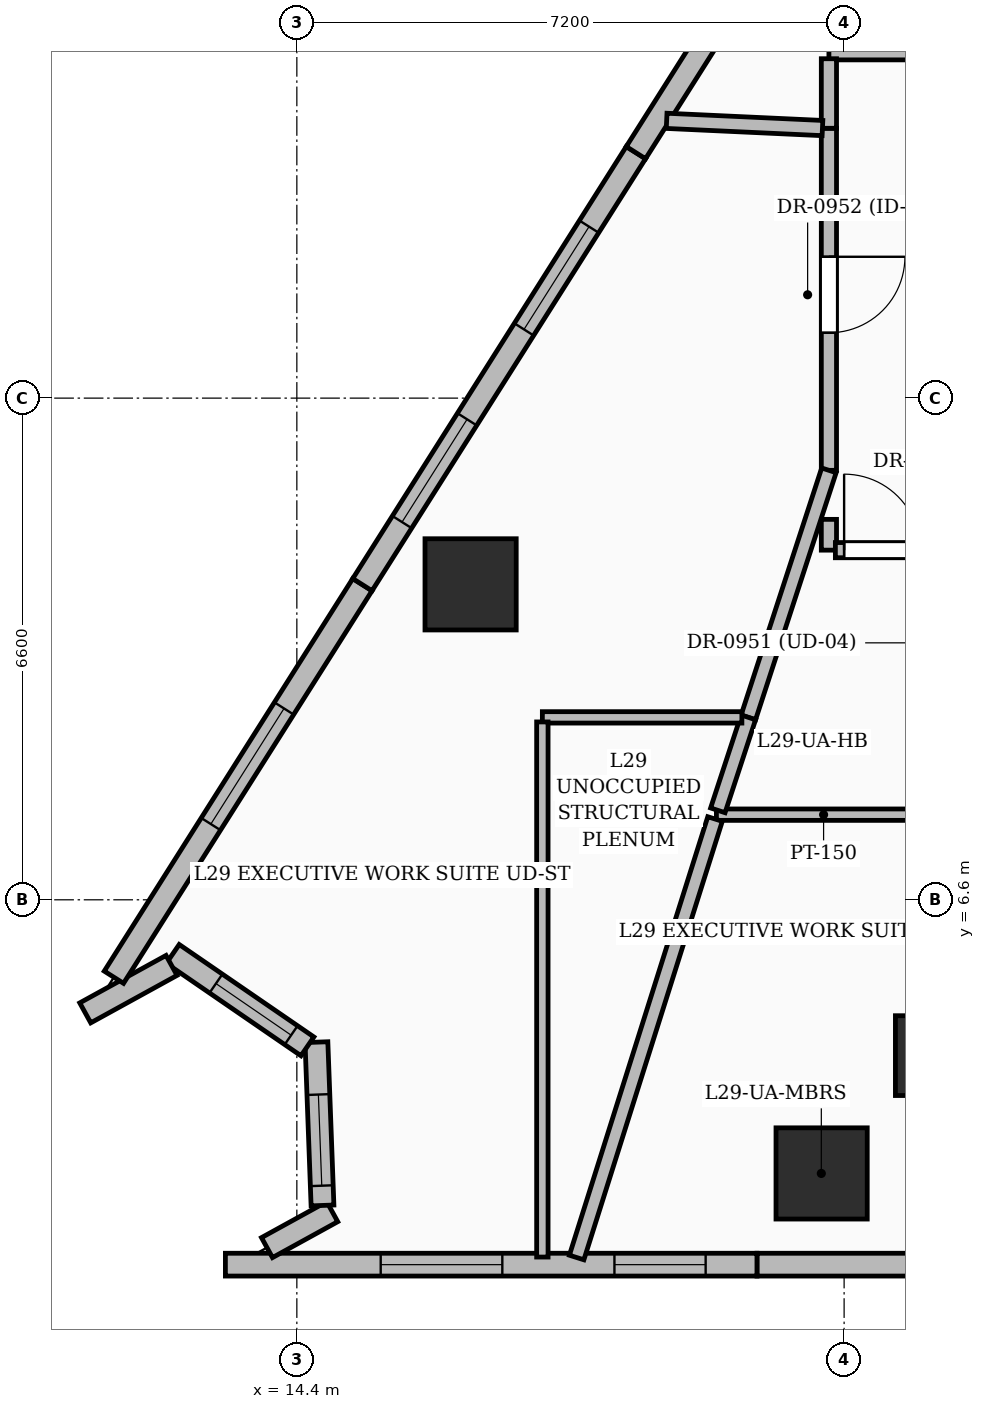
"""IFC4 building model, lengths in metres.
Left out: names, types, materials, properties, quantities, classifications, styles, units other than length and angle.
Written with IfcOpenShell. Run it as: python <this file> out.ifc"""

import sys

from ifc_helpers import new_model, si_unit, direction, frame, frame_2d, origin, origin_2d, place, context, subcontext, project, spatial, rectangle, extrude, element, fill, save


model = new_model("IFC4")
c1 = context("Model", 3, precision=1e-05, world=origin(), true_north=direction((0.0, 1.0)))
c2 = subcontext(c1, "Body", "Model", "MODEL_VIEW")
j1 = project(units=[si_unit("LENGTHUNIT", "METRE"), si_unit("PLANEANGLEUNIT", "RADIAN")], contexts=[c1])
p1 = place(None, origin())
s1 = spatial("IfcSite", under=j1, at=p1, CompositionType="ELEMENT")
p2 = place(p1, origin())
s2 = spatial("IfcBuilding", under=s1, at=p2, CompositionType="ELEMENT")
p3 = place(p2, frame((0.0, 0.0, 117.6)))
s3 = spatial("IfcBuildingStorey", under=s2, at=p3, CompositionType="ELEMENT", Elevation=117.6)
p4 = place(p3, frame((22.8, 4.55, 0.0), z_axis=(0.0, 0.0, 1.0), x_axis=(1.0, 0.0, 0.0)))
e1 = element("IfcColumn", 1, at=p4, inside=s3, PredefinedType="COLUMN", context=c2, shape_type="SweptSolid", body=[
    extrude(rectangle(XDim=1.05, YDim=1.05, at=origin_2d()), origin(), (0.0, 0.0, 1.0), 3.6),
])
for number, where, z_axis, x_axis in (
    (2, (21.304, 3.0, 0.0), (0.0, 0.0, 1.0), (1.0, 0.0, 0.0)),
    (3, (16.686, 10.75, 0.0), (0.0, 0.0, 1.0), (1.0, 0.0, 0.0)),
):
    element("IfcColumn", number, at=place(p3, frame(where, z_axis=z_axis, x_axis=x_axis)), inside=s3, PredefinedType="COLUMN", context=c2, shape_type="SweptSolid", body=[
        extrude(rectangle(XDim=1.2, YDim=1.2, at=origin_2d()), origin(), (0.0, 0.0, 1.0), 3.6),
    ])
p5 = place(p3, frame((27.447, 1.8, 0.0), z_axis=(0.0, 0.0, 1.0), x_axis=(-1.0, 0.0, 0.0)))
e4 = element("IfcWall", 4, at=p5, inside=s3, PredefinedType="SOLIDWALL", context=c2, shape_type="SweptSolid", body=[
    extrude(rectangle(XDim=6.993, YDim=0.3, at=frame_2d((3.497, 0.0))), origin(), (0.0, 0.0, 1.0), 3.35),
])
p6 = place(p5, frame((1.625, 0.0, 0.6)))
e5 = element("IfcOpeningElement", 5, at=p6, cuts=e4, PredefinedType="OPENING", context=c2, shape_type="SweptSolid", body=[
    extrude(rectangle(XDim=1.8, YDim=2.1, at=frame_2d((0.9, 1.05))), frame((0.0, 0.16, 0.0), z_axis=(0.0, -1.0, 0.0), x_axis=(1.0, 0.0, 0.0)), (0.0, 0.0, 1.0), 0.32),
])
p7 = place(p3, frame((20.453, 1.8, 0.0), z_axis=(0.0, 0.0, 1.0), x_axis=(-1.0, 0.0, 0.0)))
e6 = element("IfcWall", 6, at=p7, inside=s3, PredefinedType="SOLIDWALL", context=c2, shape_type="SweptSolid", body=[
    extrude(rectangle(XDim=6.993, YDim=0.3, at=frame_2d((3.497, 0.0))), origin(), (0.0, 0.0, 1.0), 3.35),
])
p8 = place(p7, frame((0.675, 0.0, 0.8)))
e7 = element("IfcOpeningElement", 7, at=p8, cuts=e6, PredefinedType="OPENING", context=c2, shape_type="SweptSolid", body=[
    extrude(rectangle(XDim=1.2, YDim=1.8, at=frame_2d((0.6, 0.9))), frame((0.0, 0.16, 0.0), z_axis=(0.0, -1.0, 0.0), x_axis=(1.0, 0.0, 0.0)), (0.0, 0.0, 1.0), 0.32),
])
p9 = place(p7, frame((3.35, 0.0, 0.55)))
e8 = element("IfcOpeningElement", 8, at=p9, cuts=e6, PredefinedType="OPENING", context=c2, shape_type="SweptSolid", body=[
    extrude(rectangle(XDim=1.6, YDim=2.2, at=frame_2d((0.8, 1.1))), frame((0.0, 0.16, 0.0), z_axis=(0.0, -1.0, 0.0), x_axis=(1.0, 0.0, 0.0)), (0.0, 0.0, 1.0), 0.32),
])
p10 = place(p3, frame((14.007, 2.024, 0.0), z_axis=(0.0, 0.0, 1.0), x_axis=(0.876089618579, 0.482148296914, 0.0)))
e9 = element("IfcWall", 9, at=p10, inside=s3, PredefinedType="SOLIDWALL", context=c2, shape_type="SweptSolid", body=[
    extrude(rectangle(XDim=0.98, YDim=0.3, at=frame_2d((0.49, 0.0))), origin(), (0.0, 0.0, 1.0), 3.35),
])
p11 = place(p3, frame((14.738, 2.579, 0.0), z_axis=(0.0, 0.0, 1.0), x_axis=(-0.037141892545, 0.99931000186, 0.0)))
e10 = element("IfcWall", 10, at=p11, inside=s3, PredefinedType="SOLIDWALL", context=c2, shape_type="SweptSolid", body=[
    extrude(rectangle(XDim=2.149, YDim=0.3, at=frame_2d((1.075, 0.0))), origin(), (0.0, 0.0, 1.0), 3.35),
])
p12 = place(p11, frame((0.26, 0.0, 0.8)))
e11 = element("IfcOpeningElement", 11, at=p12, cuts=e10, PredefinedType="OPENING", context=c2, shape_type="SweptSolid", body=[
    extrude(rectangle(XDim=1.2, YDim=1.8, at=frame_2d((0.6, 0.9))), frame((0.0, 0.16, 0.0), z_axis=(0.0, -1.0, 0.0), x_axis=(1.0, 0.0, 0.0)), (0.0, 0.0, 1.0), 0.32),
])
p13 = place(p3, frame((14.539, 4.672, 0.0), z_axis=(0.0, 0.0, 1.0), x_axis=(-0.824422928204, 0.565974235678, 0.0)))
e12 = element("IfcWall", 12, at=p13, inside=s3, PredefinedType="SOLIDWALL", context=c2, shape_type="SweptSolid", body=[
    extrude(rectangle(XDim=2.149, YDim=0.3, at=frame_2d((1.075, 0.0))), origin(), (0.0, 0.0, 1.0), 3.35),
])
p14 = place(p13, frame((0.26, 0.0, 0.8)))
e13 = element("IfcOpeningElement", 13, at=p14, cuts=e12, PredefinedType="OPENING", context=c2, shape_type="SweptSolid", body=[
    extrude(rectangle(XDim=1.2, YDim=1.8, at=frame_2d((0.6, 0.9))), frame((0.0, 0.16, 0.0), z_axis=(0.0, -1.0, 0.0), x_axis=(1.0, 0.0, 0.0)), (0.0, 0.0, 1.0), 0.32),
])
p15 = place(p3, frame((12.752, 5.737, 0.0), z_axis=(0.0, 0.0, 1.0), x_axis=(-0.876299432815, -0.481766856527, 0.0)))
e14 = element("IfcWall", 14, at=p15, inside=s3, PredefinedType="SOLIDWALL", context=c2, shape_type="SweptSolid", body=[
    extrude(rectangle(XDim=1.296, YDim=0.3, at=frame_2d((0.648, 0.0))), origin(), (0.0, 0.0, 1.0), 3.35),
])
p16 = place(p3, frame((11.993, 5.581, 0.0), z_axis=(0.0, 0.0, 1.0), x_axis=(0.534883870605, 0.844925585461, 0.0)))
e15 = element("IfcWall", 15, at=p16, inside=s3, PredefinedType="SOLIDWALL", context=c2, shape_type="SweptSolid", body=[
    extrude(rectangle(XDim=6.112, YDim=0.3, at=frame_2d((3.056, 0.0))), origin(), (0.0, 0.0, 1.0), 3.35),
])
p17 = place(p16, frame((2.385, 0.0, 0.6)))
e16 = element("IfcOpeningElement", 16, at=p17, cuts=e15, PredefinedType="OPENING", context=c2, shape_type="SweptSolid", body=[
    extrude(rectangle(XDim=1.8, YDim=2.1, at=frame_2d((0.9, 1.05))), frame((0.0, 0.16, 0.0), z_axis=(0.0, -1.0, 0.0), x_axis=(1.0, 0.0, 0.0)), (0.0, 0.0, 1.0), 0.32),
])
p18 = place(p3, frame((15.262, 10.746, 0.0), z_axis=(0.0, 0.0, 1.0), x_axis=(0.534880248718, 0.844927878302, 0.0)))
e17 = element("IfcWall", 17, at=p18, inside=s3, PredefinedType="SOLIDWALL", context=c2, shape_type="SweptSolid", body=[
    extrude(rectangle(XDim=6.727, YDim=0.3, at=frame_2d((3.364, 0.0))), origin(), (0.0, 0.0, 1.0), 3.35),
])
p19 = place(p18, frame((3.975, 0.0, 0.55)))
e18 = element("IfcOpeningElement", 18, at=p19, cuts=e17, PredefinedType="OPENING", context=c2, shape_type="SweptSolid", body=[
    extrude(rectangle(XDim=1.6, YDim=2.2, at=frame_2d((0.8, 1.1))), frame((0.0, 0.16, 0.0), z_axis=(0.0, -1.0, 0.0), x_axis=(1.0, 0.0, 0.0)), (0.0, 0.0, 1.0), 0.32),
])
p20 = place(p18, frame((0.975, 0.0, 0.55)))
e19 = element("IfcOpeningElement", 19, at=p20, cuts=e17, PredefinedType="OPENING", context=c2, shape_type="SweptSolid", body=[
    extrude(rectangle(XDim=1.6, YDim=2.2, at=frame_2d((0.8, 1.1))), frame((0.0, 0.16, 0.0), z_axis=(0.0, -1.0, 0.0), x_axis=(1.0, 0.0, 0.0)), (0.0, 0.0, 1.0), 0.32),
])
p21 = place(p3, frame((18.861, 16.429, 0.0), z_axis=(0.0, 0.0, 1.0), x_axis=(0.534891708764, 0.844920623429, 0.0)))
e20 = element("IfcWall", 20, at=p21, inside=s3, PredefinedType="SOLIDWALL", context=c2, shape_type="SweptSolid", body=[
    extrude(rectangle(XDim=6.447, YDim=0.3, at=frame_2d((3.224, 0.0))), origin(), (0.0, 0.0, 1.0), 3.35),
])
p22 = place(p21, frame((2.775, 0.0, 0.6)))
e21 = element("IfcOpeningElement", 21, at=p22, cuts=e20, PredefinedType="OPENING", context=c2, shape_type="SweptSolid", body=[
    extrude(rectangle(XDim=1.5, YDim=2.1, at=frame_2d((0.75, 1.05))), frame((0.0, 0.16, 0.0), z_axis=(0.0, -1.0, 0.0), x_axis=(1.0, 0.0, 0.0)), (0.0, 0.0, 1.0), 0.32),
])
p23 = place(p3, frame((21.4, 11.605, 0.0), z_axis=(0.0, 0.0, 1.0), x_axis=(0.0, -1.0, 0.0)))
e22 = element("IfcWall", 22, at=p23, inside=s3, PredefinedType="PARTITIONING", context=c2, shape_type="SweptSolid", body=[
    extrude(rectangle(XDim=0.405, YDim=0.2, at=frame_2d((0.203, 0.0))), origin(), (0.0, 0.0, 1.0), 2.771),
])
p24 = place(p3, frame((21.485, 11.2, 0.0), z_axis=(0.0, 0.0, 1.0), x_axis=(1.0, 0.0, 0.0)))
e23 = element("IfcWall", 23, at=p24, inside=s3, PredefinedType="PARTITIONING", context=c2, shape_type="SweptSolid", body=[
    extrude(rectangle(XDim=1.315, YDim=0.2, at=frame_2d((0.657, 0.0))), origin(), (0.0, 0.0, 1.0), 2.771),
])
p25 = place(p24, frame((0.115, 0.0, 0.0)))
e24 = element("IfcOpeningElement", 24, at=p25, cuts=e23, PredefinedType="OPENING", context=c2, shape_type="SweptSolid", body=[
    extrude(rectangle(XDim=1.0, YDim=2.2, at=frame_2d((0.5, 1.1))), frame((0.0, 0.11, 0.0), z_axis=(0.0, -1.0, 0.0), x_axis=(1.0, 0.0, 0.0)), (0.0, 0.0, 1.0), 0.22),
])
p26 = place(p3, frame((21.4, 16.75, 0.0), z_axis=(0.0, 0.0, 1.0), x_axis=(0.0, -1.0, 0.0)))
e25 = element("IfcWall", 25, at=p26, inside=s3, PredefinedType="PARTITIONING", context=c2, shape_type="SweptSolid", body=[
    extrude(rectangle(XDim=4.5, YDim=0.2, at=frame_2d((2.25, 0.0))), origin(), (0.0, 0.0, 1.0), 2.771),
])
p27 = place(p26, frame((1.69, 0.0, 0.0)))
e26 = element("IfcOpeningElement", 26, at=p27, cuts=e25, PredefinedType="OPENING", context=c2, shape_type="SweptSolid", body=[
    extrude(rectangle(XDim=1.0, YDim=2.2, at=frame_2d((0.5, 1.1))), frame((0.0, 0.11, 0.0), z_axis=(0.0, -1.0, 0.0), x_axis=(1.0, 0.0, 0.0)), (0.0, 0.0, 1.0), 0.22),
])
p28 = place(p3, frame((25.89, 17.75, 0.0), z_axis=(0.0, 0.0, 1.0), x_axis=(-1.0, 0.0, 0.0)))
e27 = element("IfcWall", 27, at=p28, inside=s3, PredefinedType="PARTITIONING", context=c2, shape_type="SweptSolid", body=[
    extrude(rectangle(XDim=4.49, YDim=0.2, at=frame_2d((2.245, 0.0))), origin(), (0.0, 0.0, 1.0), 2.372),
])
p29 = place(p28, frame((1.686, 0.0, 0.0)))
e28 = element("IfcOpeningElement", 28, at=p29, cuts=e27, PredefinedType="OPENING", context=c2, shape_type="SweptSolid", body=[
    extrude(rectangle(XDim=1.0, YDim=2.2, at=frame_2d((0.5, 1.1))), frame((0.0, 0.11, 0.0), z_axis=(0.0, -1.0, 0.0), x_axis=(1.0, 0.0, 0.0)), (0.0, 0.0, 1.0), 0.22),
])
p30 = place(p3, frame((21.4, 17.665, 0.0), z_axis=(0.0, 0.0, 1.0), x_axis=(0.0, -1.0, 0.0)))
e29 = element("IfcWall", 29, at=p30, inside=s3, PredefinedType="PARTITIONING", context=c2, shape_type="SweptSolid", body=[
    extrude(rectangle(XDim=0.915, YDim=0.2, at=frame_2d((0.458, 0.0))), origin(), (0.0, 0.0, 1.0), 2.57),
])
p31 = place(p3, frame((19.92, 7.72, 0.0), z_axis=(0.0, 0.0, 1.0), x_axis=(1.0, 0.0, 0.0)))
e30 = element("IfcWall", 30, at=p31, inside=s3, PredefinedType="PARTITIONING", context=c2, shape_type="SweptSolid", body=[
    extrude(rectangle(XDim=2.82, YDim=0.15, at=frame_2d((1.41, 0.0))), origin(), (0.0, 0.0, 1.0), 3.35),
])
p32 = place(p3, frame((21.4, 12.25, 0.0), z_axis=(0.0, 0.0, 1.0), x_axis=(-0.310029019977, -0.950727093741, 0.0)))
e31 = element("IfcWall", 31, at=p32, inside=s3, PredefinedType="PARTITIONING", context=c2, shape_type="SweptSolid", body=[
    extrude(rectangle(XDim=3.418, YDim=0.2, at=frame_2d((1.709, 0.0))), origin(), (0.0, 0.0, 1.0), 2.372),
])
p33 = place(p3, frame((20.34, 9.0, 0.0), z_axis=(0.0, 0.0, 1.0), x_axis=(-0.311842662142, -0.950133755883, 0.0)))
e32 = element("IfcWall", 32, at=p33, inside=s3, PredefinedType="PARTITIONING", context=c2, shape_type="SweptSolid", body=[
    extrude(rectangle(XDim=1.287, YDim=0.2, at=frame_2d((0.644, 0.0))), origin(), (0.0, 0.0, 1.0), 3.35),
])
p34 = place(p3, frame((19.902, 7.663, 0.0), z_axis=(0.0, 0.0, 1.0), x_axis=(-0.300992296292, -0.953626571344, 0.0)))
e33 = element("IfcWall", 33, at=p34, inside=s3, PredefinedType="PARTITIONING", context=c2, shape_type="SweptSolid", body=[
    extrude(rectangle(XDim=6.049, YDim=0.2, at=frame_2d((3.025, 0.0))), origin(), (0.0, 0.0, 1.0), 2.57),
])
p35 = place(p3, frame((17.63, 9.0, 0.0), z_axis=(0.0, 0.0, 1.0), x_axis=(1.0, 0.0, 0.0)))
e34 = element("IfcWall", 34, at=p35, inside=s3, PredefinedType="PARTITIONING", context=c2, shape_type="SweptSolid", body=[
    extrude(rectangle(XDim=2.625, YDim=0.15, at=frame_2d((1.312, 0.0))), origin(), (0.0, 0.0, 1.0), 2.57),
])
p36 = place(p3, frame((21.315, 16.753, 0.0), z_axis=(0.0, 0.0, 1.0), x_axis=(-0.998928926466, 0.046270939795, 0.0)))
e35 = element("IfcWall", 35, at=p36, inside=s3, PredefinedType="PARTITIONING", context=c2, shape_type="SweptSolid", body=[
    extrude(rectangle(XDim=2.052, YDim=0.2, at=frame_2d((1.026, 0.0))), origin(), (0.0, 0.0, 1.0), 2.57),
])
p37 = place(p3, frame((17.63, 8.94, 0.0), z_axis=(0.0, 0.0, 1.0), x_axis=(0.0, -1.0, 0.0)))
e36 = element("IfcWall", 36, at=p37, inside=s3, PredefinedType="PARTITIONING", context=c2, shape_type="SweptSolid", body=[
    extrude(rectangle(XDim=7.04, YDim=0.15, at=frame_2d((3.52, 0.0))), origin(), (0.0, 0.0, 1.0), 2.57),
])
p38 = place(p8, origin())
e37 = element("IfcWindow", 37, at=p38, inside=s3, PartitioningType="SINGLE_PANEL", PredefinedType="WINDOW", context=c2, shape_type="SweptSolid", body=[
    extrude(rectangle(XDim=1.2, YDim=1.8, at=frame_2d((0.6, 0.9))), frame((0.0, 0.03, 0.0), z_axis=(0.0, -1.0, 0.0), x_axis=(1.0, 0.0, 0.0)), (0.0, 0.0, 1.0), 0.06),
])
fill(e7, e37)
p39 = place(p9, origin())
e38 = element("IfcWindow", 38, at=p39, inside=s3, PartitioningType="SINGLE_PANEL", PredefinedType="WINDOW", context=c2, shape_type="SweptSolid", body=[
    extrude(rectangle(XDim=1.6, YDim=2.2, at=frame_2d((0.8, 1.1))), frame((0.0, 0.03, 0.0), z_axis=(0.0, -1.0, 0.0), x_axis=(1.0, 0.0, 0.0)), (0.0, 0.0, 1.0), 0.06),
])
fill(e8, e38)
p40 = place(p12, origin())
e39 = element("IfcWindow", 39, at=p40, inside=s3, PartitioningType="SINGLE_PANEL", PredefinedType="WINDOW", context=c2, shape_type="SweptSolid", body=[
    extrude(rectangle(XDim=1.2, YDim=1.8, at=frame_2d((0.6, 0.9))), frame((0.0, 0.03, 0.0), z_axis=(0.0, -1.0, 0.0), x_axis=(1.0, 0.0, 0.0)), (0.0, 0.0, 1.0), 0.06),
])
fill(e11, e39)
p41 = place(p14, origin())
e40 = element("IfcWindow", 40, at=p41, inside=s3, PartitioningType="SINGLE_PANEL", PredefinedType="WINDOW", context=c2, shape_type="SweptSolid", body=[
    extrude(rectangle(XDim=1.2, YDim=1.8, at=frame_2d((0.6, 0.9))), frame((0.0, 0.03, 0.0), z_axis=(0.0, -1.0, 0.0), x_axis=(1.0, 0.0, 0.0)), (0.0, 0.0, 1.0), 0.06),
])
fill(e13, e40)
p42 = place(p17, origin())
e41 = element("IfcWindow", 41, at=p42, inside=s3, PartitioningType="SINGLE_PANEL", PredefinedType="WINDOW", context=c2, shape_type="SweptSolid", body=[
    extrude(rectangle(XDim=1.8, YDim=2.1, at=frame_2d((0.9, 1.05))), frame((0.0, 0.03, 0.0), z_axis=(0.0, -1.0, 0.0), x_axis=(1.0, 0.0, 0.0)), (0.0, 0.0, 1.0), 0.06),
])
fill(e16, e41)
p43 = place(p19, origin())
e42 = element("IfcWindow", 42, at=p43, inside=s3, PartitioningType="SINGLE_PANEL", PredefinedType="WINDOW", context=c2, shape_type="SweptSolid", body=[
    extrude(rectangle(XDim=1.6, YDim=2.2, at=frame_2d((0.8, 1.1))), frame((0.0, 0.03, 0.0), z_axis=(0.0, -1.0, 0.0), x_axis=(1.0, 0.0, 0.0)), (0.0, 0.0, 1.0), 0.06),
])
fill(e18, e42)
p44 = place(p20, origin())
e43 = element("IfcWindow", 43, at=p44, inside=s3, PartitioningType="SINGLE_PANEL", PredefinedType="WINDOW", context=c2, shape_type="SweptSolid", body=[
    extrude(rectangle(XDim=1.6, YDim=2.2, at=frame_2d((0.8, 1.1))), frame((0.0, 0.03, 0.0), z_axis=(0.0, -1.0, 0.0), x_axis=(1.0, 0.0, 0.0)), (0.0, 0.0, 1.0), 0.06),
])
fill(e19, e43)
p45 = place(p27, origin())
e44 = element("IfcDoor", 44, at=p45, inside=s3, OperationType="SINGLE_SWING_LEFT", PredefinedType="DOOR", context=c2, shape_type="SweptSolid", body=[
    extrude(rectangle(XDim=1.0, YDim=2.2, at=frame_2d((0.5, 1.1))), frame((0.0, 0.025, 0.0), z_axis=(0.0, -1.0, 0.0), x_axis=(1.0, 0.0, 0.0)), (0.0, 0.0, 1.0), 0.05),
])
fill(e26, e44)
p46 = place(p25, origin())
e45 = element("IfcDoor", 45, at=p46, inside=s3, OperationType="SINGLE_SWING_LEFT", PredefinedType="DOOR", context=c2, shape_type="SweptSolid", body=[
    extrude(rectangle(XDim=1.0, YDim=2.2, at=frame_2d((0.5, 1.1))), frame((0.0, 0.025, 0.0), z_axis=(0.0, -1.0, 0.0), x_axis=(1.0, 0.0, 0.0)), (0.0, 0.0, 1.0), 0.05),
])
fill(e24, e45)
save(model, sys.argv[1])
